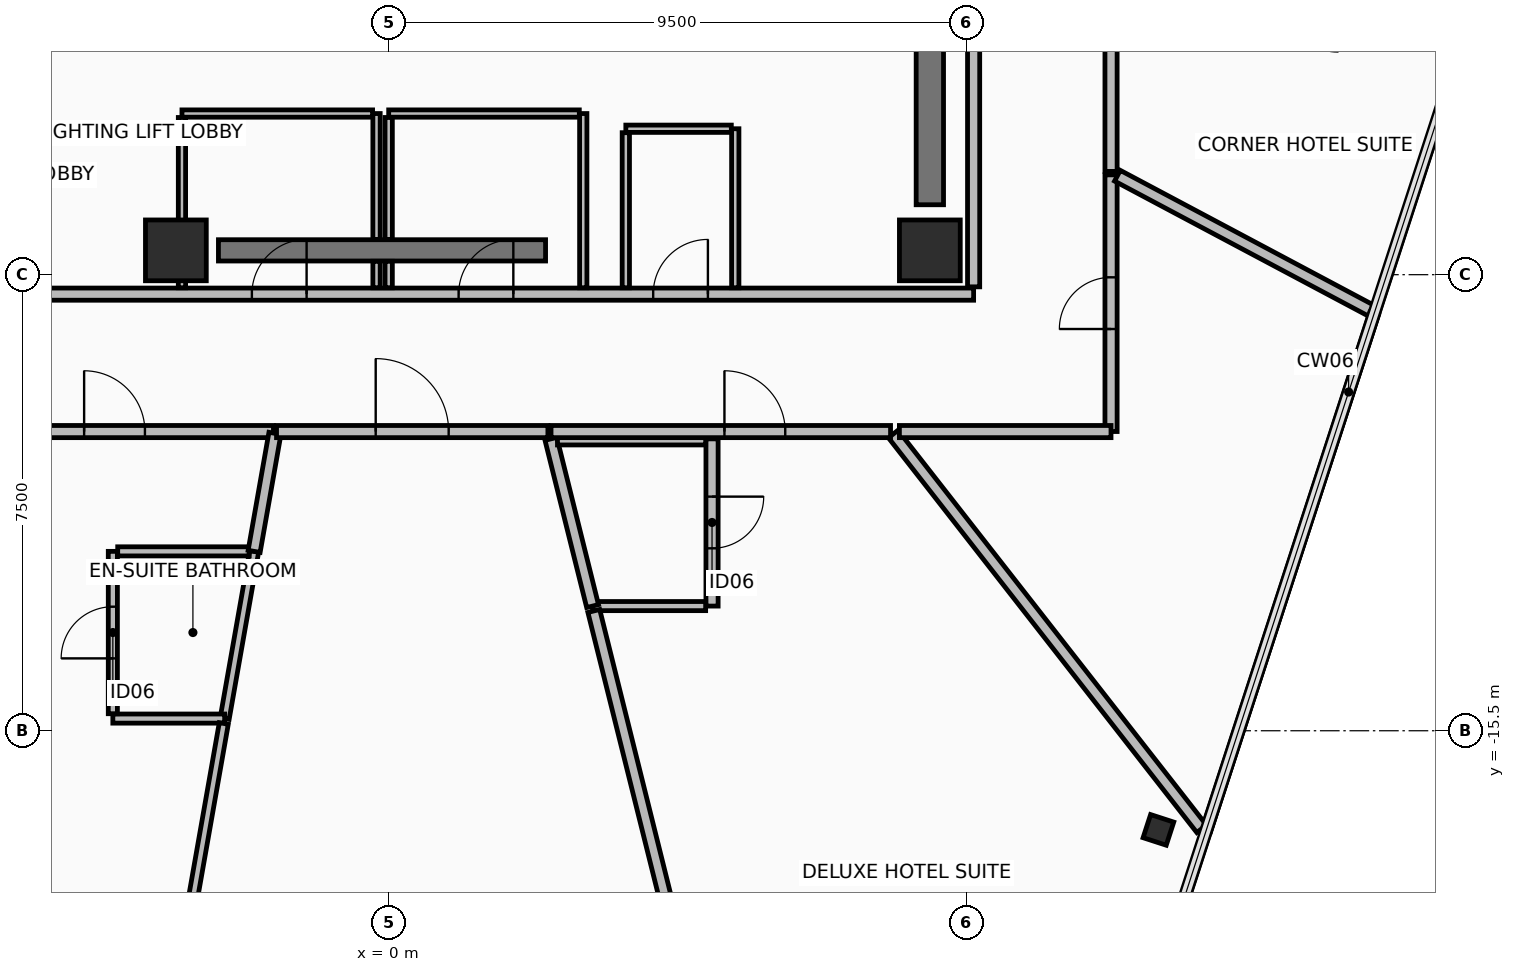
"""IFC4 building model, lengths in metres.
Left out: names, types, materials, properties, quantities, classifications, styles, units other than length and angle.
Written with IfcOpenShell. Run it as: python <this file> out.ifc"""

import sys

from ifc_helpers import new_model, si_unit, direction, frame, frame_2d, origin, origin_2d, place, context, subcontext, project, spatial, rectangle, hollow_rectangle, extrude, element, fill, save


model = new_model("IFC4")
c1 = context("Model", 3, precision=1e-05, world=origin(), true_north=direction((0.0, 1.0)))
c2 = subcontext(c1, "Body", "Model", "MODEL_VIEW")
j1 = project(units=[si_unit("LENGTHUNIT", "METRE"), si_unit("PLANEANGLEUNIT", "RADIAN")], contexts=[c1])
p1 = place(None, origin())
s1 = spatial("IfcSite", under=j1, at=p1, CompositionType="ELEMENT")
p2 = place(p1, origin())
s2 = spatial("IfcBuilding", under=s1, at=p2, CompositionType="ELEMENT")
p3 = place(p2, frame((0.0, 0.0, 294.35)))
s3 = spatial("IfcBuildingStorey", under=s2, at=p3, CompositionType="ELEMENT", Elevation=294.35)
for number, where, z_axis, x_axis in (
    (1, (-3.5, -7.6, 0.0), (0.0, 0.0, 1.0), (1.0, 0.0, 0.0)),
    (2, (8.9, -7.6, 0.0), (0.0, 0.0, 1.0), (1.0, 0.0, 0.0)),
):
    element("IfcColumn", number, at=place(p3, frame(where, z_axis=z_axis, x_axis=x_axis)), inside=s3, PredefinedType="COLUMN", context=c2, shape_type="SweptSolid", body=[
        extrude(rectangle(XDim=1.0, YDim=1.0, at=origin_2d()), origin(), (0.0, 0.0, 1.0), 3.65),
    ])
p4 = place(p3, frame((12.659, -17.131, 0.0), z_axis=(0.0, 0.0, 1.0), x_axis=(0.309018654281, 0.951055976957, 0.0)))
e3 = element("IfcColumn", 3, at=p4, inside=s3, PredefinedType="COLUMN", context=c2, shape_type="SweptSolid", body=[
    extrude(hollow_rectangle(XDim=0.4, YDim=0.4, WallThickness=0.025, at=origin_2d()), origin(), (0.0, 0.0, 1.0), 3.65),
])
p5 = place(p3, frame((-2.8, -7.6, 0.0), z_axis=(0.0, 0.0, 1.0), x_axis=(1.0, 0.0, 0.0)))
e4 = element("IfcWall", 4, at=p5, inside=s3, PredefinedType="SHEAR", context=c2, shape_type="SweptSolid", body=[
    extrude(rectangle(XDim=5.38, YDim=0.35, at=frame_2d((2.69, 0.0))), origin(), (0.0, 0.0, 1.0), 3.45),
])
p6 = place(p3, frame((8.9, -6.85, 0.0), z_axis=(0.0, 0.0, 1.0), x_axis=(0.0, 1.0, 0.0)))
e5 = element("IfcWall", 5, at=p6, inside=s3, PredefinedType="SHEAR", context=c2, shape_type="SweptSolid", body=[
    extrude(rectangle(XDim=10.7, YDim=0.45, at=frame_2d((5.35, 0.0))), origin(), (0.0, 0.0, 1.0), 3.45),
])
p7 = place(p3, frame((-9.62, -8.32, 0.0), z_axis=(0.0, 0.0, 1.0), x_axis=(1.0, 0.0, 0.0)))
e6 = element("IfcWall", 6, at=p7, inside=s3, PredefinedType="PARTITIONING", context=c2, shape_type="SweptSolid", body=[
    extrude(rectangle(XDim=19.24, YDim=0.2, at=frame_2d((9.62, 0.0))), origin(), (0.0, 0.0, 1.0), 2.945),
])
p8 = place(p7, frame((7.37, 0.0, 0.0)))
e7 = element("IfcOpeningElement", 7, at=p8, cuts=e6, PredefinedType="OPENING", context=c2, shape_type="SweptSolid", body=[
    extrude(rectangle(XDim=0.9, YDim=2.1, at=frame_2d((0.45, 1.05))), frame((0.0, 0.11, 0.0), z_axis=(0.0, -1.0, 0.0), x_axis=(1.0, 0.0, 0.0)), (0.0, 0.0, 1.0), 0.22),
])
p9 = place(p7, frame((10.77, 0.0, 0.0)))
e8 = element("IfcOpeningElement", 8, at=p9, cuts=e6, PredefinedType="OPENING", context=c2, shape_type="SweptSolid", body=[
    extrude(rectangle(XDim=0.9, YDim=2.1, at=frame_2d((0.45, 1.05))), frame((0.0, 0.11, 0.0), z_axis=(0.0, -1.0, 0.0), x_axis=(1.0, 0.0, 0.0)), (0.0, 0.0, 1.0), 0.22),
])
p10 = place(p7, frame((13.97, 0.0, 0.0)))
e9 = element("IfcOpeningElement", 9, at=p10, cuts=e6, PredefinedType="OPENING", context=c2, shape_type="SweptSolid", body=[
    extrude(rectangle(XDim=0.9, YDim=2.1, at=frame_2d((0.45, 1.05))), frame((0.0, 0.11, 0.0), z_axis=(0.0, -1.0, 0.0), x_axis=(1.0, 0.0, 0.0)), (0.0, 0.0, 1.0), 0.22),
])
p11 = place(p3, frame((9.62, -8.2, 0.0), z_axis=(0.0, 0.0, 1.0), x_axis=(0.0, 1.0, 0.0)))
e10 = element("IfcWall", 10, at=p11, inside=s3, PredefinedType="PARTITIONING", context=c2, shape_type="SweptSolid", body=[
    extrude(rectangle(XDim=16.4, YDim=0.2, at=frame_2d((8.2, 0.0))), origin(), (0.0, 0.0, 1.0), 2.945),
])
p12 = place(p11, frame((12.65, 0.0, 0.0)))
e11 = element("IfcOpeningElement", 11, at=p12, cuts=e10, PredefinedType="OPENING", context=c2, shape_type="SweptSolid", body=[
    extrude(rectangle(XDim=1.1, YDim=2.15, at=frame_2d((0.55, 1.075))), frame((0.0, 0.11, 0.0), z_axis=(0.0, -1.0, 0.0), x_axis=(1.0, 0.0, 0.0)), (0.0, 0.0, 1.0), 0.22),
])
p13 = place(p3, frame((-0.2, -8.215, 0.0), z_axis=(0.0, 0.0, 1.0), x_axis=(0.0, 1.0, 0.0)))
e12 = element("IfcWall", 12, at=p13, inside=s3, PredefinedType="PARTITIONING", context=c2, shape_type="SweptSolid", body=[
    extrude(rectangle(XDim=0.435, YDim=0.12, at=frame_2d((0.218, 0.0))), origin(), (0.0, 0.0, 1.0), 2.745),
])
p14 = place(p3, frame((-0.2, -7.42, 0.0), z_axis=(0.0, 0.0, 1.0), x_axis=(0.0, 1.0, 0.0)))
e13 = element("IfcWall", 13, at=p14, inside=s3, PredefinedType="PARTITIONING", context=c2, shape_type="SweptSolid", body=[
    extrude(rectangle(XDim=2.07, YDim=0.12, at=frame_2d((1.035, 0.0))), origin(), (0.0, 0.0, 1.0), 2.745),
])
p15 = place(p3, frame((-0.265, -5.35, 0.0), z_axis=(0.0, 0.0, 1.0), x_axis=(-1.0, 0.0, 0.0)))
e14 = element("IfcWall", 14, at=p15, inside=s3, PredefinedType="PARTITIONING", context=c2, shape_type="SweptSolid", body=[
    extrude(rectangle(XDim=3.135, YDim=0.12, at=frame_2d((1.567, 0.0))), origin(), (0.0, 0.0, 1.0), 2.745),
])
p16 = place(p3, frame((-3.4, -5.415, 0.0), z_axis=(0.0, 0.0, 1.0), x_axis=(0.0, -1.0, 0.0)))
e15 = element("IfcWall", 15, at=p16, inside=s3, PredefinedType="PARTITIONING", context=c2, shape_type="SweptSolid", body=[
    extrude(rectangle(XDim=2.8, YDim=0.12, at=frame_2d((1.4, 0.0))), origin(), (0.0, 0.0, 1.0), 2.745),
])
p17 = place(p3, frame((3.2, -8.215, 0.0), z_axis=(0.0, 0.0, 1.0), x_axis=(0.0, 1.0, 0.0)))
e16 = element("IfcWall", 16, at=p17, inside=s3, PredefinedType="PARTITIONING", context=c2, shape_type="SweptSolid", body=[
    extrude(rectangle(XDim=2.865, YDim=0.12, at=frame_2d((1.433, 0.0))), origin(), (0.0, 0.0, 1.0), 2.745),
])
p18 = place(p3, frame((3.135, -5.35, 0.0), z_axis=(0.0, 0.0, 1.0), x_axis=(-1.0, 0.0, 0.0)))
e17 = element("IfcWall", 17, at=p18, inside=s3, PredefinedType="PARTITIONING", context=c2, shape_type="SweptSolid", body=[
    extrude(rectangle(XDim=3.135, YDim=0.12, at=frame_2d((1.567, 0.0))), origin(), (0.0, 0.0, 1.0), 3.45),
])
p19 = place(p3, frame((0.0, -5.415, 0.0), z_axis=(0.0, 0.0, 1.0), x_axis=(0.0, -1.0, 0.0)))
e18 = element("IfcWall", 18, at=p19, inside=s3, PredefinedType="PARTITIONING", context=c2, shape_type="SweptSolid", body=[
    extrude(rectangle(XDim=2.005, YDim=0.12, at=frame_2d((1.002, 0.0))), origin(), (0.0, 0.0, 1.0), 2.745),
])
p20 = place(p3, frame((0.0, -7.78, 0.0), z_axis=(0.0, 0.0, 1.0), x_axis=(0.0, -1.0, 0.0)))
e19 = element("IfcWall", 19, at=p20, inside=s3, PredefinedType="PARTITIONING", context=c2, shape_type="SweptSolid", body=[
    extrude(rectangle(XDim=0.435, YDim=0.12, at=frame_2d((0.218, 0.0))), origin(), (0.0, 0.0, 1.0), 2.745),
])
p21 = place(p3, frame((5.7, -8.215, 0.0), z_axis=(0.0, 0.0, 1.0), x_axis=(0.0, 1.0, 0.0)))
e20 = element("IfcWall", 20, at=p21, inside=s3, PredefinedType="PARTITIONING", context=c2, shape_type="SweptSolid", body=[
    extrude(rectangle(XDim=2.615, YDim=0.12, at=frame_2d((1.308, 0.0))), origin(), (0.0, 0.0, 1.0), 2.745),
])
p22 = place(p3, frame((5.635, -5.6, 0.0), z_axis=(0.0, 0.0, 1.0), x_axis=(-1.0, 0.0, 0.0)))
e21 = element("IfcWall", 21, at=p22, inside=s3, PredefinedType="PARTITIONING", context=c2, shape_type="SweptSolid", body=[
    extrude(rectangle(XDim=1.735, YDim=0.12, at=frame_2d((0.868, 0.0))), origin(), (0.0, 0.0, 1.0), 3.45),
])
p23 = place(p3, frame((3.9, -5.665, 0.0), z_axis=(0.0, 0.0, 1.0), x_axis=(0.0, -1.0, 0.0)))
e22 = element("IfcWall", 22, at=p23, inside=s3, PredefinedType="PARTITIONING", context=c2, shape_type="SweptSolid", body=[
    extrude(rectangle(XDim=2.55, YDim=0.12, at=frame_2d((1.275, 0.0))), origin(), (0.0, 0.0, 1.0), 2.745),
])
p24 = place(p3, frame((-2.213, -12.55, 0.0), z_axis=(0.0, 0.0, 1.0), x_axis=(-0.173635703618, -0.984809952442, 0.0)))
e23 = element("IfcWall", 23, at=p24, inside=s3, PredefinedType="PARTITIONING", context=c2, shape_type="SweptSolid", body=[
    extrude(rectangle(XDim=2.792, YDim=0.15, at=frame_2d((1.396, 0.0))), origin(), (0.0, 0.0, 1.0), 3.205),
])
p25 = place(p3, frame((-2.698, -15.3, 0.0), z_axis=(0.0, 0.0, 1.0), x_axis=(-1.0, 0.0, 0.0)))
e24 = element("IfcWall", 24, at=p25, inside=s3, PredefinedType="PARTITIONING", context=c2, shape_type="SweptSolid", body=[
    extrude(rectangle(XDim=1.839, YDim=0.15, at=frame_2d((0.919, 0.0))), origin(), (0.0, 0.0, 1.0), 3.45),
])
p26 = place(p3, frame((-4.537, -15.22, 0.0), z_axis=(0.0, 0.0, 1.0), x_axis=(0.0, 1.0, 0.0)))
e25 = element("IfcWall", 25, at=p26, inside=s3, PredefinedType="PARTITIONING", context=c2, shape_type="SweptSolid", body=[
    extrude(rectangle(XDim=2.67, YDim=0.15, at=frame_2d((1.335, 0.0))), origin(), (0.0, 0.0, 1.0), 2.945),
])
p27 = place(p26, frame((0.91, 0.0, 0.0)))
e26 = element("IfcOpeningElement", 26, at=p27, cuts=e25, PredefinedType="OPENING", context=c2, shape_type="SweptSolid", body=[
    extrude(rectangle(XDim=0.85, YDim=2.1, at=frame_2d((0.425, 1.05))), frame((0.0, 0.085, 0.0), z_axis=(0.0, -1.0, 0.0), x_axis=(1.0, 0.0, 0.0)), (0.0, 0.0, 1.0), 0.17),
])
p28 = place(p3, frame((-4.457, -12.55, 0.0), z_axis=(0.0, 0.0, 1.0), x_axis=(1.0, 0.0, 0.0)))
e27 = element("IfcWall", 27, at=p28, inside=s3, PredefinedType="PARTITIONING", context=c2, shape_type="SweptSolid", body=[
    extrude(rectangle(XDim=2.163, YDim=0.15, at=frame_2d((1.081, 0.0))), origin(), (0.0, 0.0, 1.0), 2.945),
])
p29 = place(p3, frame((5.318, -10.7, 0.0), z_axis=(0.0, 0.0, 1.0), x_axis=(0.0, -1.0, 0.0)))
e28 = element("IfcWall", 28, at=p29, inside=s3, PredefinedType="PARTITIONING", context=c2, shape_type="SweptSolid", body=[
    extrude(rectangle(XDim=2.75, YDim=0.2, at=frame_2d((1.375, 0.0))), origin(), (0.0, 0.0, 1.0), 3.45),
])
p30 = place(p29, frame((0.95, 0.0, 0.0)))
e29 = element("IfcOpeningElement", 29, at=p30, cuts=e28, PredefinedType="OPENING", context=c2, shape_type="SweptSolid", body=[
    extrude(rectangle(XDim=0.85, YDim=2.1, at=frame_2d((0.425, 1.05))), frame((0.0, 0.11, 0.0), z_axis=(0.0, -1.0, 0.0), x_axis=(1.0, 0.0, 0.0)), (0.0, 0.0, 1.0), 0.22),
])
p31 = place(p3, frame((5.213, -13.45, 0.0), z_axis=(0.0, 0.0, 1.0), x_axis=(-1.0, 0.0, 0.0)))
e30 = element("IfcWall", 30, at=p31, inside=s3, PredefinedType="PARTITIONING", context=c2, shape_type="SweptSolid", body=[
    extrude(rectangle(XDim=1.859, YDim=0.15, at=frame_2d((0.93, 0.0))), origin(), (0.0, 0.0, 1.0), 3.45),
])
p32 = place(p3, frame((3.354, -13.45, 0.0), z_axis=(0.0, 0.0, 1.0), x_axis=(-0.241968071048, 0.970284212277, 0.0)))
e31 = element("IfcWall", 31, at=p32, inside=s3, PredefinedType="PARTITIONING", context=c2, shape_type="SweptSolid", body=[
    extrude(rectangle(XDim=2.834, YDim=0.2, at=frame_2d((1.417, 0.0))), origin(), (0.0, 0.0, 1.0), 3.45),
])
p33 = place(p3, frame((2.776, -10.7, 0.0), z_axis=(0.0, 0.0, 1.0), x_axis=(1.0, 0.0, 0.0)))
e32 = element("IfcWall", 32, at=p33, inside=s3, PredefinedType="PARTITIONING", context=c2, shape_type="SweptSolid", body=[
    extrude(rectangle(XDim=2.437, YDim=0.2, at=frame_2d((1.219, 0.0))), origin(), (0.0, 0.0, 1.0), 3.45),
])
p34 = place(p3, frame((11.88, -10.579, 0.0), z_axis=(0.0, 0.0, 1.0), x_axis=(0.0, 1.0, 0.0)))
e33 = element("IfcWall", 33, at=p34, inside=s3, PredefinedType="PARTITIONING", context=c2, shape_type="SweptSolid", body=[
    extrude(rectangle(XDim=4.221, YDim=0.2, at=frame_2d((2.11, 0.0))), origin(), (0.0, 0.0, 1.0), 3.205),
])
p35 = place(p34, frame((1.686, 0.0, 0.0)))
e34 = element("IfcOpeningElement", 34, at=p35, cuts=e33, PredefinedType="OPENING", context=c2, shape_type="SweptSolid", body=[
    extrude(rectangle(XDim=0.85, YDim=2.1, at=frame_2d((0.425, 1.05))), frame((0.0, 0.11, 0.0), z_axis=(0.0, -1.0, 0.0), x_axis=(1.0, 0.0, 0.0)), (0.0, 0.0, 1.0), 0.22),
])
p36 = place(p3, frame((11.985, -6.373, 0.0), z_axis=(0.0, 0.0, 1.0), x_axis=(0.882951887582, -0.469463485498, 0.0)))
e35 = element("IfcWall", 35, at=p36, inside=s3, PredefinedType="PARTITIONING", context=c2, shape_type="SweptSolid", body=[
    extrude(rectangle(XDim=4.767, YDim=0.2, at=frame_2d((2.384, 0.0))), origin(), (0.0, 0.0, 1.0), 2.795),
])
p37 = place(p3, frame((16.206, -8.64, 0.0), z_axis=(0.0, 0.0, 1.0), x_axis=(-0.308993456207, -0.951064163988, 0.0)))
e36 = element("IfcWall", 36, at=p37, inside=s3, PredefinedType="PARTITIONING", context=c2, shape_type="SweptSolid", body=[
    extrude(rectangle(XDim=8.941, YDim=0.15, at=frame_2d((4.47, 0.0))), origin(), (0.0, 0.0, 1.0), 3.45),
])
p38 = place(p3, frame((13.37, -17.112, 0.0), z_axis=(0.0, 0.0, 1.0), x_axis=(-0.615658418865, 0.788013141566, 0.0)))
e37 = element("IfcWall", 37, at=p38, inside=s3, PredefinedType="PARTITIONING", context=c2, shape_type="SweptSolid", body=[
    extrude(rectangle(XDim=8.238, YDim=0.2, at=frame_2d((4.119, 0.0))), origin(), (0.0, 0.0, 1.0), 2.795),
])
p39 = place(p3, frame((8.399, -10.58, 0.0), z_axis=(0.0, 0.0, 1.0), x_axis=(1.0, 0.0, 0.0)))
e38 = element("IfcWall", 38, at=p39, inside=s3, PredefinedType="PARTITIONING", context=c2, shape_type="SweptSolid", body=[
    extrude(rectangle(XDim=3.48, YDim=0.2, at=frame_2d((1.74, 0.0))), origin(), (0.0, 0.0, 1.0), 2.945),
])
p40 = place(p3, frame((-7.123, -10.58, 0.0), z_axis=(0.0, 0.0, 1.0), x_axis=(1.0, 0.0, 0.0)))
e39 = element("IfcWall", 39, at=p40, inside=s3, PredefinedType="PARTITIONING", context=c2, shape_type="SweptSolid", body=[
    extrude(rectangle(XDim=5.228, YDim=0.2, at=frame_2d((2.614, 0.0))), origin(), (0.0, 0.0, 1.0), 2.945),
])
p41 = place(p40, frame((2.114, 0.0, 0.0)))
e40 = element("IfcOpeningElement", 40, at=p41, cuts=e39, PredefinedType="OPENING", context=c2, shape_type="SweptSolid", body=[
    extrude(rectangle(XDim=1.0, YDim=2.15, at=frame_2d((0.5, 1.075))), frame((0.0, 0.11, 0.0), z_axis=(0.0, -1.0, 0.0), x_axis=(1.0, 0.0, 0.0)), (0.0, 0.0, 1.0), 0.22),
])
p42 = place(p3, frame((-1.871, -10.609, 0.0), z_axis=(0.0, 0.0, 1.0), x_axis=(-0.17369345517, -0.984799768294, 0.0)))
e41 = element("IfcWall", 41, at=p42, inside=s3, PredefinedType="PARTITIONING", context=c2, shape_type="SweptSolid", body=[
    extrude(rectangle(XDim=1.971, YDim=0.2, at=frame_2d((0.985, 0.0))), origin(), (0.0, 0.0, 1.0), 3.45),
])
p43 = place(p3, frame((-2.712, -15.38, 0.0), z_axis=(0.0, 0.0, 1.0), x_axis=(-0.173640563607, -0.984809095546, 0.0)))
e42 = element("IfcWall", 42, at=p43, inside=s3, PredefinedType="PARTITIONING", context=c2, shape_type="SweptSolid", body=[
    extrude(rectangle(XDim=9.524, YDim=0.15, at=frame_2d((4.762, 0.0))), origin(), (0.0, 0.0, 1.0), 2.795),
])
p44 = place(p3, frame((-1.844, -10.58, 0.0), z_axis=(0.0, 0.0, 1.0), x_axis=(1.0, 0.0, 0.0)))
e43 = element("IfcWall", 43, at=p44, inside=s3, PredefinedType="PARTITIONING", context=c2, shape_type="SweptSolid", body=[
    extrude(rectangle(XDim=4.463, YDim=0.2, at=frame_2d((2.231, 0.0))), origin(), (0.0, 0.0, 1.0), 3.45),
])
p45 = place(p44, frame((1.631, 0.0, 0.0)))
e44 = element("IfcOpeningElement", 44, at=p45, cuts=e43, PredefinedType="OPENING", context=c2, shape_type="SweptSolid", body=[
    extrude(rectangle(XDim=1.2, YDim=2.15, at=frame_2d((0.6, 1.075))), frame((0.0, 0.11, 0.0), z_axis=(0.0, -1.0, 0.0), x_axis=(1.0, 0.0, 0.0)), (0.0, 0.0, 1.0), 0.22),
])
p46 = place(p3, frame((3.373, -13.53, 0.0), z_axis=(0.0, 0.0, 1.0), x_axis=(0.24193474073, -0.970292523535, 0.0)))
e45 = element("IfcWall", 45, at=p46, inside=s3, PredefinedType="PARTITIONING", context=c2, shape_type="SweptSolid", body=[
    extrude(rectangle(XDim=20.173, YDim=0.2, at=frame_2d((10.087, 0.0))), origin(), (0.0, 0.0, 1.0), 2.795),
])
p47 = place(p3, frame((2.67, -10.58, 0.0), z_axis=(0.0, 0.0, 1.0), x_axis=(1.0, 0.0, 0.0)))
e46 = element("IfcWall", 46, at=p47, inside=s3, PredefinedType="PARTITIONING", context=c2, shape_type="SweptSolid", body=[
    extrude(rectangle(XDim=5.584, YDim=0.2, at=frame_2d((2.792, 0.0))), origin(), (0.0, 0.0, 1.0), 2.945),
])
p48 = place(p47, frame((2.852, 0.0, 0.0)))
e47 = element("IfcOpeningElement", 47, at=p48, cuts=e46, PredefinedType="OPENING", context=c2, shape_type="SweptSolid", body=[
    extrude(rectangle(XDim=1.0, YDim=2.15, at=frame_2d((0.5, 1.075))), frame((0.0, 0.11, 0.0), z_axis=(0.0, -1.0, 0.0), x_axis=(1.0, 0.0, 0.0)), (0.0, 0.0, 1.0), 0.22),
])
p49 = place(p3, frame((11.88, -6.302, 0.0), z_axis=(0.0, 0.0, 1.0), x_axis=(0.0, 1.0, 0.0)))
e48 = element("IfcWall", 48, at=p49, inside=s3, PredefinedType="PARTITIONING", context=c2, shape_type="SweptSolid", body=[
    extrude(rectangle(XDim=5.444, YDim=0.2, at=frame_2d((2.722, 0.0))), origin(), (0.0, 0.0, 1.0), 2.945),
])
p50 = place(p49, frame((2.222, 0.0, 0.0)))
e49 = element("IfcOpeningElement", 49, at=p50, cuts=e48, PredefinedType="OPENING", context=c2, shape_type="SweptSolid", body=[
    extrude(rectangle(XDim=1.0, YDim=2.15, at=frame_2d((0.5, 1.075))), frame((0.0, 0.11, 0.0), z_axis=(0.0, -1.0, 0.0), x_axis=(1.0, 0.0, 0.0)), (0.0, 0.0, 1.0), 0.22),
])
p51 = place(p8, frame((0.9, 0.0, 0.0), z_axis=(0.0, 0.0, 1.0), x_axis=(-1.0, 0.0, 0.0)))
e50 = element("IfcDoor", 50, at=p51, inside=s3, OperationType="SINGLE_SWING_LEFT", PredefinedType="DOOR", context=c2, shape_type="SweptSolid", body=[
    extrude(rectangle(XDim=0.9, YDim=2.1, at=frame_2d((0.45, 1.05))), frame((0.0, 0.025, 0.0), z_axis=(0.0, -1.0, 0.0), x_axis=(1.0, 0.0, 0.0)), (0.0, 0.0, 1.0), 0.05),
])
fill(e7, e50)
p52 = place(p9, frame((0.9, 0.0, 0.0), z_axis=(0.0, 0.0, 1.0), x_axis=(-1.0, 0.0, 0.0)))
e51 = element("IfcDoor", 51, at=p52, inside=s3, OperationType="SINGLE_SWING_LEFT", PredefinedType="DOOR", context=c2, shape_type="SweptSolid", body=[
    extrude(rectangle(XDim=0.9, YDim=2.1, at=frame_2d((0.45, 1.05))), frame((0.0, 0.025, 0.0), z_axis=(0.0, -1.0, 0.0), x_axis=(1.0, 0.0, 0.0)), (0.0, 0.0, 1.0), 0.05),
])
fill(e8, e51)
p53 = place(p10, frame((0.9, 0.0, 0.0), z_axis=(0.0, 0.0, 1.0), x_axis=(-1.0, 0.0, 0.0)))
e52 = element("IfcDoor", 52, at=p53, inside=s3, OperationType="SINGLE_SWING_LEFT", PredefinedType="DOOR", context=c2, shape_type="SweptSolid", body=[
    extrude(rectangle(XDim=0.9, YDim=2.1, at=frame_2d((0.45, 1.05))), frame((0.0, 0.025, 0.0), z_axis=(0.0, -1.0, 0.0), x_axis=(1.0, 0.0, 0.0)), (0.0, 0.0, 1.0), 0.05),
])
fill(e9, e52)
p54 = place(p27, origin())
e53 = element("IfcDoor", 53, at=p54, inside=s3, OperationType="SINGLE_SWING_RIGHT", PredefinedType="DOOR", context=c2, shape_type="SweptSolid", body=[
    extrude(rectangle(XDim=0.85, YDim=2.1, at=frame_2d((0.425, 1.05))), frame((0.0, 0.025, 0.0), z_axis=(0.0, -1.0, 0.0), x_axis=(1.0, 0.0, 0.0)), (0.0, 0.0, 1.0), 0.05),
])
fill(e26, e53)
p55 = place(p30, origin())
e54 = element("IfcDoor", 54, at=p55, inside=s3, OperationType="SINGLE_SWING_RIGHT", PredefinedType="DOOR", context=c2, shape_type="SweptSolid", body=[
    extrude(rectangle(XDim=0.85, YDim=2.1, at=frame_2d((0.425, 1.05))), frame((0.0, 0.025, 0.0), z_axis=(0.0, -1.0, 0.0), x_axis=(1.0, 0.0, 0.0)), (0.0, 0.0, 1.0), 0.05),
])
fill(e29, e54)
p56 = place(p35, origin())
e55 = element("IfcDoor", 55, at=p56, inside=s3, OperationType="SINGLE_SWING_RIGHT", PredefinedType="DOOR", context=c2, shape_type="SweptSolid", body=[
    extrude(rectangle(XDim=0.85, YDim=2.1, at=frame_2d((0.425, 1.05))), frame((0.0, 0.025, 0.0), z_axis=(0.0, -1.0, 0.0), x_axis=(1.0, 0.0, 0.0)), (0.0, 0.0, 1.0), 0.05),
])
fill(e34, e55)
p57 = place(p41, origin())
e56 = element("IfcDoor", 56, at=p57, inside=s3, OperationType="SINGLE_SWING_LEFT", PredefinedType="DOOR", context=c2, shape_type="SweptSolid", body=[
    extrude(rectangle(XDim=1.0, YDim=2.15, at=frame_2d((0.5, 1.075))), frame((0.0, 0.025, 0.0), z_axis=(0.0, -1.0, 0.0), x_axis=(1.0, 0.0, 0.0)), (0.0, 0.0, 1.0), 0.05),
])
fill(e40, e56)
p58 = place(p45, origin())
e57 = element("IfcDoor", 57, at=p58, inside=s3, OperationType="SINGLE_SWING_LEFT", PredefinedType="DOOR", context=c2, shape_type="SweptSolid", body=[
    extrude(rectangle(XDim=1.2, YDim=2.15, at=frame_2d((0.6, 1.075))), frame((0.0, 0.025, 0.0), z_axis=(0.0, -1.0, 0.0), x_axis=(1.0, 0.0, 0.0)), (0.0, 0.0, 1.0), 0.05),
])
fill(e44, e57)
p59 = place(p48, origin())
e58 = element("IfcDoor", 58, at=p59, inside=s3, OperationType="SINGLE_SWING_LEFT", PredefinedType="DOOR", context=c2, shape_type="SweptSolid", body=[
    extrude(rectangle(XDim=1.0, YDim=2.15, at=frame_2d((0.5, 1.075))), frame((0.0, 0.025, 0.0), z_axis=(0.0, -1.0, 0.0), x_axis=(1.0, 0.0, 0.0)), (0.0, 0.0, 1.0), 0.05),
])
fill(e47, e58)
save(model, sys.argv[1])
